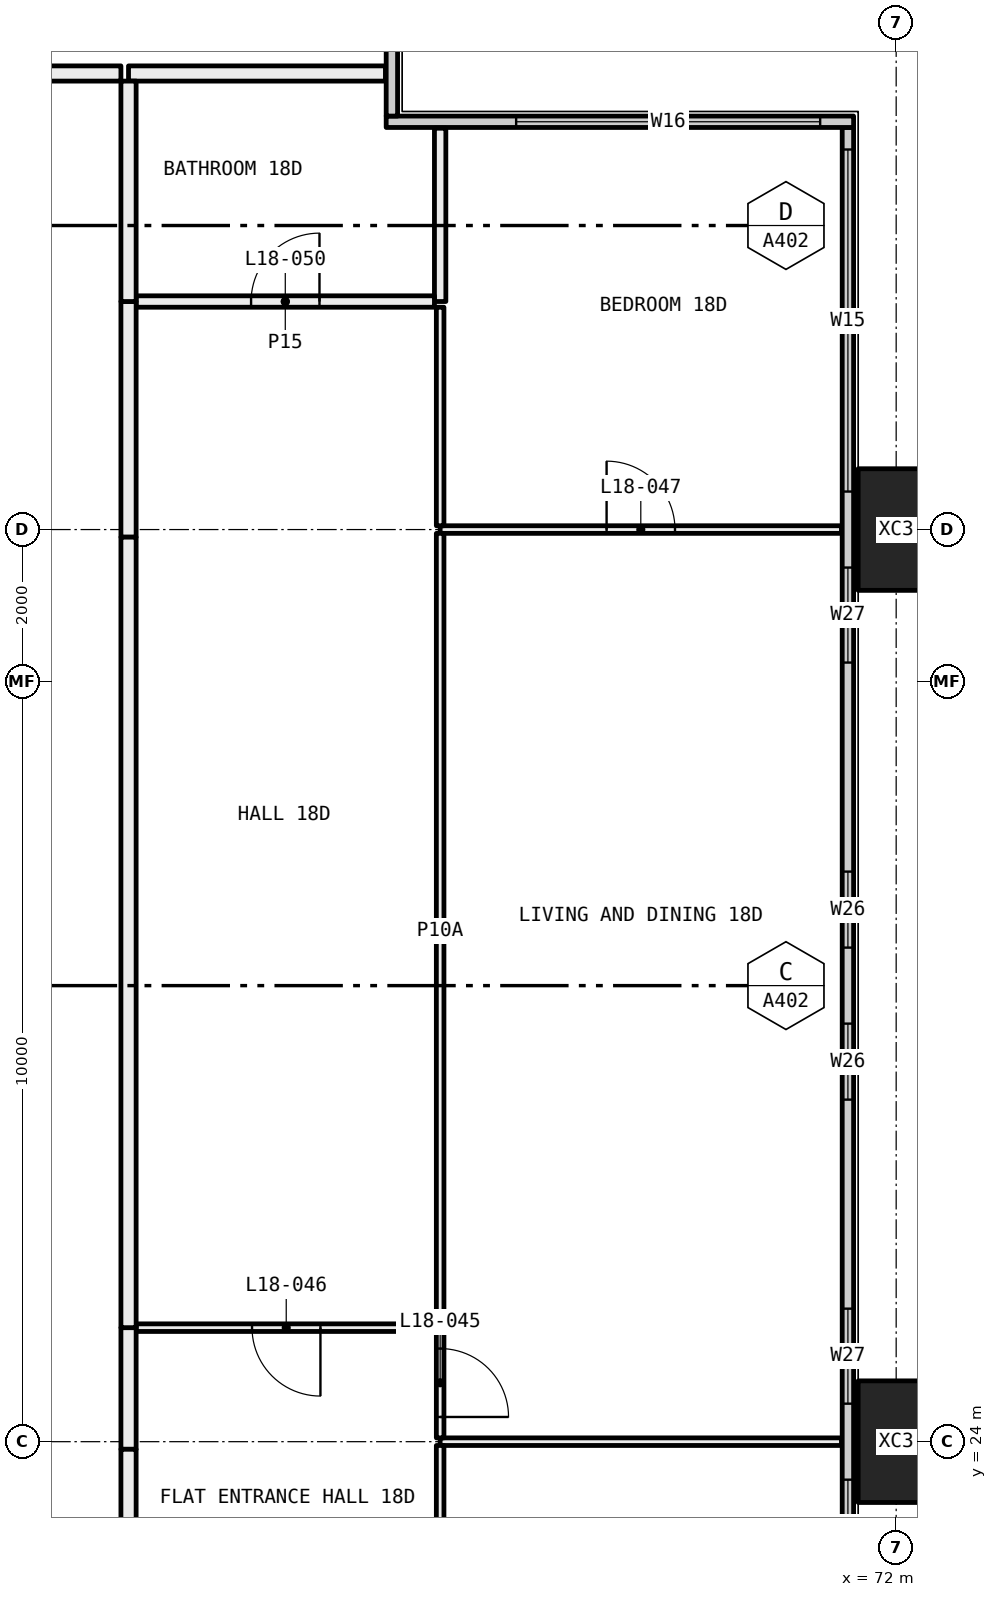
"""IFC4 building model, lengths in metres.
Left out: names, types, materials, properties, quantities, classifications, styles, units other than length and angle.
Written with IfcOpenShell. Run it as: python <this file> out.ifc"""

import sys

from ifc_helpers import new_model, si_unit, direction, frame, frame_2d, origin, origin_2d, place, context, subcontext, project, spatial, rectangle, hollow_rectangle, extrude, element, fill, save


model = new_model("IFC4")
c1 = context("Model", 3, precision=1e-05, world=origin(), true_north=direction((0.0, 1.0)))
c2 = subcontext(c1, "Body", "Model", "MODEL_VIEW")
j1 = project(units=[si_unit("LENGTHUNIT", "METRE"), si_unit("PLANEANGLEUNIT", "RADIAN")], contexts=[c1])
p1 = place(None, origin())
s1 = spatial("IfcSite", under=j1, at=p1, CompositionType="ELEMENT")
p2 = place(p1, origin())
s2 = spatial("IfcBuilding", under=s1, at=p2, CompositionType="ELEMENT")
p3 = place(p2, frame((0.0, 0.0, 74.85)))
s3 = spatial("IfcBuildingStorey", under=s2, at=p3, CompositionType="ELEMENT", Elevation=74.85)
for number, where, z_axis, x_axis in (
    (1, (72.0, 24.0, -0.4), (0.0, 0.0, 1.0), (0.0, 1.0, 0.0)),
    (2, (72.0, 36.0, -0.4), (0.0, 0.0, 1.0), (0.0, 1.0, 0.0)),
):
    element("IfcColumn", number, at=place(p3, frame(where, z_axis=z_axis, x_axis=x_axis)), inside=s3, PredefinedType="COLUMN", context=c2, shape_type="SweptSolid", body=[
        extrude(hollow_rectangle(XDim=1.6, YDim=1.0, WallThickness=0.065, at=origin_2d()), origin(), (0.0, 0.0, 1.0), 3.45),
    ])
p4 = place(p3, frame((71.365, 6.71, 0.0), z_axis=(0.0, 0.0, 1.0), x_axis=(0.0, 1.0, 0.0)))
e3 = element("IfcWall", 3, at=p4, inside=s3, PredefinedType="ELEMENTEDWALL", context=c2, shape_type="SweptSolid", body=[
    extrude(rectangle(XDim=34.58, YDim=0.15, at=frame_2d((17.29, 0.0))), origin(), (0.0, 0.0, 1.0), 3.05),
])
p5 = place(p4, frame((0.29, 0.0, 0.45)))
e4 = element("IfcOpeningElement", 4, at=p5, cuts=e3, PredefinedType="OPENING", context=c2, shape_type="SweptSolid", body=[
    extrude(rectangle(XDim=4.5, YDim=2.55, at=frame_2d((2.25, 1.275))), frame((0.0, 0.085, 0.0), z_axis=(0.0, -1.0, 0.0), x_axis=(1.0, 0.0, 0.0)), (0.0, 0.0, 1.0), 0.17),
])
p6 = place(p4, frame((5.79, 0.0, 0.45)))
e5 = element("IfcOpeningElement", 5, at=p6, cuts=e3, PredefinedType="OPENING", context=c2, shape_type="SweptSolid", body=[
    extrude(rectangle(XDim=1.25, YDim=2.55, at=frame_2d((0.625, 1.275))), frame((0.0, 0.085, 0.0), z_axis=(0.0, -1.0, 0.0), x_axis=(1.0, 0.0, 0.0)), (0.0, 0.0, 1.0), 0.17),
])
p7 = place(p4, frame((9.79, 0.0, 0.45)))
e6 = element("IfcOpeningElement", 6, at=p7, cuts=e3, PredefinedType="OPENING", context=c2, shape_type="SweptSolid", body=[
    extrude(rectangle(XDim=1.0, YDim=2.55, at=frame_2d((0.5, 1.275))), frame((0.0, 0.085, 0.0), z_axis=(0.0, -1.0, 0.0), x_axis=(1.0, 0.0, 0.0)), (0.0, 0.0, 1.0), 0.17),
])
p8 = place(p4, frame((11.79, 0.0, 0.45)))
e7 = element("IfcOpeningElement", 7, at=p8, cuts=e3, PredefinedType="OPENING", context=c2, shape_type="SweptSolid", body=[
    extrude(rectangle(XDim=1.0, YDim=2.55, at=frame_2d((0.5, 1.275))), frame((0.0, 0.085, 0.0), z_axis=(0.0, -1.0, 0.0), x_axis=(1.0, 0.0, 0.0)), (0.0, 0.0, 1.0), 0.17),
])
p9 = place(p4, frame((15.54, 0.0, 0.45)))
e8 = element("IfcOpeningElement", 8, at=p9, cuts=e3, PredefinedType="OPENING", context=c2, shape_type="SweptSolid", body=[
    extrude(rectangle(XDim=1.25, YDim=2.55, at=frame_2d((0.625, 1.275))), frame((0.0, 0.085, 0.0), z_axis=(0.0, -1.0, 0.0), x_axis=(1.0, 0.0, 0.0)), (0.0, 0.0, 1.0), 0.17),
])
p10 = place(p4, frame((17.79, 0.0, 0.45)))
e9 = element("IfcOpeningElement", 9, at=p10, cuts=e3, PredefinedType="OPENING", context=c2, shape_type="SweptSolid", body=[
    extrude(rectangle(XDim=1.25, YDim=2.55, at=frame_2d((0.625, 1.275))), frame((0.0, 0.085, 0.0), z_axis=(0.0, -1.0, 0.0), x_axis=(1.0, 0.0, 0.0)), (0.0, 0.0, 1.0), 0.17),
])
p11 = place(p4, frame((21.79, 0.0, 0.45)))
e10 = element("IfcOpeningElement", 10, at=p11, cuts=e3, PredefinedType="OPENING", context=c2, shape_type="SweptSolid", body=[
    extrude(rectangle(XDim=1.0, YDim=2.55, at=frame_2d((0.5, 1.275))), frame((0.0, 0.085, 0.0), z_axis=(0.0, -1.0, 0.0), x_axis=(1.0, 0.0, 0.0)), (0.0, 0.0, 1.0), 0.17),
])
p12 = place(p4, frame((23.79, 0.0, 0.45)))
e11 = element("IfcOpeningElement", 11, at=p12, cuts=e3, PredefinedType="OPENING", context=c2, shape_type="SweptSolid", body=[
    extrude(rectangle(XDim=1.0, YDim=2.55, at=frame_2d((0.5, 1.275))), frame((0.0, 0.085, 0.0), z_axis=(0.0, -1.0, 0.0), x_axis=(1.0, 0.0, 0.0)), (0.0, 0.0, 1.0), 0.17),
])
p13 = place(p4, frame((27.54, 0.0, 0.45)))
e12 = element("IfcOpeningElement", 12, at=p13, cuts=e3, PredefinedType="OPENING", context=c2, shape_type="SweptSolid", body=[
    extrude(rectangle(XDim=1.25, YDim=2.55, at=frame_2d((0.625, 1.275))), frame((0.0, 0.085, 0.0), z_axis=(0.0, -1.0, 0.0), x_axis=(1.0, 0.0, 0.0)), (0.0, 0.0, 1.0), 0.17),
])
p14 = place(p4, frame((29.79, 0.0, 0.45)))
e13 = element("IfcOpeningElement", 13, at=p14, cuts=e3, PredefinedType="OPENING", context=c2, shape_type="SweptSolid", body=[
    extrude(rectangle(XDim=4.5, YDim=2.55, at=frame_2d((2.25, 1.275))), frame((0.0, 0.085, 0.0), z_axis=(0.0, -1.0, 0.0), x_axis=(1.0, 0.0, 0.0)), (0.0, 0.0, 1.0), 0.17),
])
p15 = place(p3, frame((65.29, 41.365, 0.0), z_axis=(0.0, 0.0, 1.0), x_axis=(1.0, 0.0, 0.0)))
e14 = element("IfcWall", 14, at=p15, inside=s3, PredefinedType="ELEMENTEDWALL", context=c2, shape_type="SweptSolid", body=[
    extrude(rectangle(XDim=6.15, YDim=0.15, at=frame_2d((3.075, 0.0))), origin(), (0.0, 0.0, 1.0), 3.05),
])
p16 = place(p15, frame((1.71, 0.0, 0.45)))
e15 = element("IfcOpeningElement", 15, at=p16, cuts=e14, PredefinedType="OPENING", context=c2, shape_type="SweptSolid", body=[
    extrude(rectangle(XDim=4.0, YDim=2.55, at=frame_2d((2.0, 1.275))), frame((0.0, 0.085, 0.0), z_axis=(0.0, -1.0, 0.0), x_axis=(1.0, 0.0, 0.0)), (0.0, 0.0, 1.0), 0.17),
])
p17 = place(p3, frame((65.365, 41.44, 0.0), z_axis=(0.0, 0.0, 1.0), x_axis=(0.0, 1.0, 0.0)))
e16 = element("IfcWall", 16, at=p17, inside=s3, PredefinedType="ELEMENTEDWALL", context=c2, shape_type="SweptSolid", body=[
    extrude(rectangle(XDim=5.85, YDim=0.15, at=frame_2d((2.925, 0.0))), origin(), (0.0, 0.0, 1.0), 3.05),
])
p18 = place(p17, frame((1.56, 0.0, 0.45)))
e17 = element("IfcOpeningElement", 17, at=p18, cuts=e16, PredefinedType="OPENING", context=c2, shape_type="SweptSolid", body=[
    extrude(rectangle(XDim=4.0, YDim=2.55, at=frame_2d((2.0, 1.275))), frame((0.0, 0.085, 0.0), z_axis=(0.0, -1.0, 0.0), x_axis=(1.0, 0.0, 0.0)), (0.0, 0.0, 1.0), 0.17),
])
p19 = place(p3, frame((71.28, 24.0, 0.0), z_axis=(0.0, 0.0, 1.0), x_axis=(-1.0, 0.0, 0.0)))
e18 = element("IfcWall", 18, at=p19, inside=s3, PredefinedType="PARTITIONING", context=c2, shape_type="SweptSolid", body=[
    extrude(rectangle(XDim=5.28, YDim=0.1, at=frame_2d((2.64, 0.0))), origin(), (0.0, 0.0, 1.0), 2.45),
])
p20 = place(p3, frame((66.0, 23.95, 0.0), z_axis=(0.0, 0.0, 1.0), x_axis=(0.0, -1.0, 0.0)))
e19 = element("IfcWall", 19, at=p20, inside=s3, PredefinedType="PARTITIONING", context=c2, shape_type="SweptSolid", body=[
    extrude(rectangle(XDim=2.875, YDim=0.1, at=frame_2d((1.438, 0.0))), origin(), (0.0, 0.0, 1.0), 2.45),
])
p21 = place(p20, frame((0.988, 0.0, 0.0)))
e20 = element("IfcOpeningElement", 20, at=p21, cuts=e19, PredefinedType="OPENING", context=c2, shape_type="SweptSolid", body=[
    extrude(rectangle(XDim=0.9, YDim=2.1, at=frame_2d((0.45, 1.05))), frame((0.0, 0.06, 0.0), z_axis=(0.0, -1.0, 0.0), x_axis=(1.0, 0.0, 0.0)), (0.0, 0.0, 1.0), 0.12),
])
p22 = place(p3, frame((71.28, 36.0, 0.0), z_axis=(0.0, 0.0, 1.0), x_axis=(-1.0, 0.0, 0.0)))
e21 = element("IfcWall", 21, at=p22, inside=s3, PredefinedType="PARTITIONING", context=c2, shape_type="SweptSolid", body=[
    extrude(rectangle(XDim=5.28, YDim=0.1, at=frame_2d((2.64, 0.0))), origin(), (0.0, 0.0, 1.0), 2.45),
])
p23 = place(p22, frame((2.19, 0.0, 0.0)))
e22 = element("IfcOpeningElement", 22, at=p23, cuts=e21, PredefinedType="OPENING", context=c2, shape_type="SweptSolid", body=[
    extrude(rectangle(XDim=0.9, YDim=2.1, at=frame_2d((0.45, 1.05))), frame((0.0, 0.06, 0.0), z_axis=(0.0, -1.0, 0.0), x_axis=(1.0, 0.0, 0.0)), (0.0, 0.0, 1.0), 0.12),
])
p24 = place(p3, frame((66.0, 25.5, 0.0), z_axis=(0.0, 0.0, 1.0), x_axis=(0.0, -1.0, 0.0)))
e23 = element("IfcWall", 23, at=p24, inside=s3, PredefinedType="PARTITIONING", context=c2, shape_type="SweptSolid", body=[
    extrude(rectangle(XDim=1.45, YDim=0.1, at=frame_2d((0.725, 0.0))), origin(), (0.0, 0.0, 1.0), 2.45),
])
p25 = place(p24, frame((0.275, 0.0, 0.0)))
e24 = element("IfcOpeningElement", 24, at=p25, cuts=e23, PredefinedType="OPENING", context=c2, shape_type="SweptSolid", body=[
    extrude(rectangle(XDim=0.9, YDim=2.1, at=frame_2d((0.45, 1.05))), frame((0.0, 0.06, 0.0), z_axis=(0.0, -1.0, 0.0), x_axis=(1.0, 0.0, 0.0)), (0.0, 0.0, 1.0), 0.12),
])
p26 = place(p3, frame((66.0, 35.95, 0.0), z_axis=(0.0, 0.0, 1.0), x_axis=(0.0, -1.0, 0.0)))
e25 = element("IfcWall", 25, at=p26, inside=s3, PredefinedType="PARTITIONING", context=c2, shape_type="SweptSolid", body=[
    extrude(rectangle(XDim=10.45, YDim=0.1, at=frame_2d((5.225, 0.0))), origin(), (0.0, 0.0, 1.0), 2.45),
])
p27 = place(p3, frame((66.0, 38.925, 0.0), z_axis=(0.0, 0.0, 1.0), x_axis=(0.0, -1.0, 0.0)))
e26 = element("IfcWall", 26, at=p27, inside=s3, PredefinedType="PARTITIONING", context=c2, shape_type="SweptSolid", body=[
    extrude(rectangle(XDim=2.875, YDim=0.1, at=frame_2d((1.438, 0.0))), origin(), (0.0, 0.0, 1.0), 2.45),
])
p28 = place(p3, frame((66.0, 41.28, 0.0), z_axis=(0.0, 0.0, 1.0), x_axis=(0.0, -1.0, 0.0)))
e27 = element("IfcWall", 27, at=p28, inside=s3, PredefinedType="PARTITIONING", context=c2, shape_type="SweptSolid", body=[
    extrude(rectangle(XDim=2.28, YDim=0.15, at=frame_2d((1.14, 0.0))), origin(), (0.0, 0.0, 1.0), 3.05),
])
p29 = place(p3, frame((65.95, 25.5, 0.0), z_axis=(0.0, 0.0, 1.0), x_axis=(-1.0, 0.0, 0.0)))
e28 = element("IfcWall", 28, at=p29, inside=s3, PredefinedType="PARTITIONING", context=c2, shape_type="SweptSolid", body=[
    extrude(rectangle(XDim=3.95, YDim=0.1, at=frame_2d((1.975, 0.0))), origin(), (0.0, 0.0, 1.0), 3.05),
])
p30 = place(p29, frame((1.525, 0.0, 0.0)))
e29 = element("IfcOpeningElement", 29, at=p30, cuts=e28, PredefinedType="OPENING", context=c2, shape_type="SweptSolid", body=[
    extrude(rectangle(XDim=0.9, YDim=2.1, at=frame_2d((0.45, 1.05))), frame((0.0, 0.06, 0.0), z_axis=(0.0, -1.0, 0.0), x_axis=(1.0, 0.0, 0.0)), (0.0, 0.0, 1.0), 0.12),
])
p31 = place(p3, frame((61.9, 25.5, 0.0), z_axis=(0.0, 0.0, 1.0), x_axis=(0.0, -1.0, 0.0)))
e30 = element("IfcWall", 30, at=p31, inside=s3, PredefinedType="PARTITIONING", context=c2, shape_type="SweptSolid", body=[
    extrude(rectangle(XDim=1.6, YDim=0.2, at=frame_2d((0.8, 0.0))), origin(), (0.0, 0.0, 1.0), 2.45),
])
p32 = place(p3, frame((61.9, 23.9, 0.0), z_axis=(0.0, 0.0, 1.0), x_axis=(0.0, -1.0, 0.0)))
e31 = element("IfcWall", 31, at=p32, inside=s3, PredefinedType="PARTITIONING", context=c2, shape_type="SweptSolid", body=[
    extrude(rectangle(XDim=2.9, YDim=0.2, at=frame_2d((1.45, 0.0))), origin(), (0.0, 0.0, 1.0), 3.05),
])
p33 = place(p32, frame((0.95, 0.0, 0.0)))
e32 = element("IfcOpeningElement", 32, at=p33, cuts=e31, PredefinedType="OPENING", context=c2, shape_type="SweptSolid", body=[
    extrude(rectangle(XDim=1.0, YDim=2.1, at=frame_2d((0.5, 1.05))), frame((0.0, 0.11, 0.0), z_axis=(0.0, -1.0, 0.0), x_axis=(1.0, 0.0, 0.0)), (0.0, 0.0, 1.0), 0.22),
])
p34 = place(p3, frame((65.925, 39.0, 0.0), z_axis=(0.0, 0.0, 1.0), x_axis=(-1.0, 0.0, 0.0)))
e33 = element("IfcWall", 33, at=p34, inside=s3, PredefinedType="PARTITIONING", context=c2, shape_type="SweptSolid", body=[
    extrude(rectangle(XDim=3.925, YDim=0.15, at=frame_2d((1.962, 0.0))), origin(), (0.0, 0.0, 1.0), 3.05),
])
p35 = place(p34, frame((1.512, 0.0, 0.0)))
e34 = element("IfcOpeningElement", 34, at=p35, cuts=e33, PredefinedType="OPENING", context=c2, shape_type="SweptSolid", body=[
    extrude(rectangle(XDim=0.9, YDim=2.1, at=frame_2d((0.45, 1.05))), frame((0.0, 0.085, 0.0), z_axis=(0.0, -1.0, 0.0), x_axis=(1.0, 0.0, 0.0)), (0.0, 0.0, 1.0), 0.17),
])
p36 = place(p3, frame((61.9, 39.0, 0.0), z_axis=(0.0, 0.0, 1.0), x_axis=(0.0, -1.0, 0.0)))
e35 = element("IfcWall", 35, at=p36, inside=s3, PredefinedType="PARTITIONING", context=c2, shape_type="SweptSolid", body=[
    extrude(rectangle(XDim=3.1, YDim=0.2, at=frame_2d((1.55, 0.0))), origin(), (0.0, 0.0, 1.0), 2.45),
])
p37 = place(p3, frame((61.9, 35.9, 0.0), z_axis=(0.0, 0.0, 1.0), x_axis=(0.0, -1.0, 0.0)))
e36 = element("IfcWall", 36, at=p37, inside=s3, PredefinedType="PARTITIONING", context=c2, shape_type="SweptSolid", body=[
    extrude(rectangle(XDim=10.4, YDim=0.2, at=frame_2d((5.2, 0.0))), origin(), (0.0, 0.0, 1.0), 3.05),
])
p38 = place(p3, frame((65.28, 42.0, 0.0), z_axis=(0.0, 0.0, 1.0), x_axis=(-1.0, 0.0, 0.0)))
e37 = element("IfcWall", 37, at=p38, inside=s3, PredefinedType="PARTITIONING", context=c2, shape_type="SweptSolid", body=[
    extrude(rectangle(XDim=3.38, YDim=0.2, at=frame_2d((1.69, 0.0))), origin(), (0.0, 0.0, 1.0), 3.05),
])
p39 = place(p3, frame((61.9, 41.9, 0.0), z_axis=(0.0, 0.0, 1.0), x_axis=(0.0, -1.0, 0.0)))
e38 = element("IfcWall", 38, at=p39, inside=s3, PredefinedType="PARTITIONING", context=c2, shape_type="SweptSolid", body=[
    extrude(rectangle(XDim=2.9, YDim=0.2, at=frame_2d((1.45, 0.0))), origin(), (0.0, 0.0, 1.0), 3.05),
])
p40 = place(p3, frame((60.0, 42.0, 0.0), z_axis=(0.0, 0.0, 1.0), x_axis=(1.0, 0.0, 0.0)))
e39 = element("IfcWall", 39, at=p40, inside=s3, PredefinedType="PARTITIONING", context=c2, shape_type="SweptSolid", body=[
    extrude(rectangle(XDim=1.8, YDim=0.2, at=frame_2d((0.9, 0.0))), origin(), (0.0, 0.0, 1.0), 3.05),
])
p41 = place(p9, origin())
e40 = element("IfcWindow", 40, at=p41, inside=s3, PartitioningType="SINGLE_PANEL", PredefinedType="WINDOW", context=c2, shape_type="SweptSolid", body=[
    extrude(rectangle(XDim=1.25, YDim=2.55, at=frame_2d((0.625, 1.275))), frame((0.0, 0.03, 0.0), z_axis=(0.0, -1.0, 0.0), x_axis=(1.0, 0.0, 0.0)), (0.0, 0.0, 1.0), 0.06),
])
fill(e8, e40)
p42 = place(p10, origin())
e41 = element("IfcWindow", 41, at=p42, inside=s3, PartitioningType="SINGLE_PANEL", PredefinedType="WINDOW", context=c2, shape_type="SweptSolid", body=[
    extrude(rectangle(XDim=1.25, YDim=2.55, at=frame_2d((0.625, 1.275))), frame((0.0, 0.03, 0.0), z_axis=(0.0, -1.0, 0.0), x_axis=(1.0, 0.0, 0.0)), (0.0, 0.0, 1.0), 0.06),
])
fill(e9, e41)
p43 = place(p11, origin())
e42 = element("IfcWindow", 42, at=p43, inside=s3, PartitioningType="SINGLE_PANEL", PredefinedType="WINDOW", context=c2, shape_type="SweptSolid", body=[
    extrude(rectangle(XDim=1.0, YDim=2.55, at=frame_2d((0.5, 1.275))), frame((0.0, 0.03, 0.0), z_axis=(0.0, -1.0, 0.0), x_axis=(1.0, 0.0, 0.0)), (0.0, 0.0, 1.0), 0.06),
])
fill(e10, e42)
p44 = place(p12, origin())
e43 = element("IfcWindow", 43, at=p44, inside=s3, PartitioningType="SINGLE_PANEL", PredefinedType="WINDOW", context=c2, shape_type="SweptSolid", body=[
    extrude(rectangle(XDim=1.0, YDim=2.55, at=frame_2d((0.5, 1.275))), frame((0.0, 0.03, 0.0), z_axis=(0.0, -1.0, 0.0), x_axis=(1.0, 0.0, 0.0)), (0.0, 0.0, 1.0), 0.06),
])
fill(e11, e43)
p45 = place(p13, origin())
e44 = element("IfcWindow", 44, at=p45, inside=s3, PartitioningType="SINGLE_PANEL", PredefinedType="WINDOW", context=c2, shape_type="SweptSolid", body=[
    extrude(rectangle(XDim=1.25, YDim=2.55, at=frame_2d((0.625, 1.275))), frame((0.0, 0.03, 0.0), z_axis=(0.0, -1.0, 0.0), x_axis=(1.0, 0.0, 0.0)), (0.0, 0.0, 1.0), 0.06),
])
fill(e12, e44)
p46 = place(p14, origin())
e45 = element("IfcWindow", 45, at=p46, inside=s3, PartitioningType="SINGLE_PANEL", PredefinedType="WINDOW", context=c2, shape_type="SweptSolid", body=[
    extrude(rectangle(XDim=4.5, YDim=2.55, at=frame_2d((2.25, 1.275))), frame((0.0, 0.03, 0.0), z_axis=(0.0, -1.0, 0.0), x_axis=(1.0, 0.0, 0.0)), (0.0, 0.0, 1.0), 0.06),
])
fill(e13, e45)
p47 = place(p16, origin())
e46 = element("IfcWindow", 46, at=p47, inside=s3, PartitioningType="SINGLE_PANEL", PredefinedType="WINDOW", context=c2, shape_type="SweptSolid", body=[
    extrude(rectangle(XDim=4.0, YDim=2.55, at=frame_2d((2.0, 1.275))), frame((0.0, 0.03, 0.0), z_axis=(0.0, -1.0, 0.0), x_axis=(1.0, 0.0, 0.0)), (0.0, 0.0, 1.0), 0.06),
])
fill(e15, e46)
p48 = place(p25, origin())
e47 = element("IfcDoor", 47, at=p48, inside=s3, OperationType="SINGLE_SWING_LEFT", PredefinedType="DOOR", context=c2, shape_type="SweptSolid", body=[
    extrude(rectangle(XDim=0.9, YDim=2.1, at=frame_2d((0.45, 1.05))), frame((0.0, 0.025, 0.0), z_axis=(0.0, -1.0, 0.0), x_axis=(1.0, 0.0, 0.0)), (0.0, 0.0, 1.0), 0.05),
])
fill(e24, e47)
p49 = place(p30, origin())
e48 = element("IfcDoor", 48, at=p49, inside=s3, OperationType="SINGLE_SWING_RIGHT", PredefinedType="DOOR", context=c2, shape_type="SweptSolid", body=[
    extrude(rectangle(XDim=0.9, YDim=2.1, at=frame_2d((0.45, 1.05))), frame((0.0, 0.025, 0.0), z_axis=(0.0, -1.0, 0.0), x_axis=(1.0, 0.0, 0.0)), (0.0, 0.0, 1.0), 0.05),
])
fill(e29, e48)
p50 = place(p23, frame((0.9, 0.0, 0.0), x_axis=(-1.0, 0.0, 0.0)))
e49 = element("IfcDoor", 49, at=p50, inside=s3, OperationType="SINGLE_SWING_RIGHT", PredefinedType="DOOR", context=c2, shape_type="SweptSolid", body=[
    extrude(rectangle(XDim=0.9, YDim=2.1, at=frame_2d((0.45, 1.05))), frame((0.0, 0.025, 0.0), z_axis=(0.0, -1.0, 0.0), x_axis=(1.0, 0.0, 0.0)), (0.0, 0.0, 1.0), 0.05),
])
fill(e22, e49)
p51 = place(p35, frame((0.9, 0.0, 0.0), x_axis=(-1.0, 0.0, 0.0)))
e50 = element("IfcDoor", 50, at=p51, inside=s3, OperationType="SINGLE_SWING_LEFT", PredefinedType="DOOR", context=c2, shape_type="SweptSolid", body=[
    extrude(rectangle(XDim=0.9, YDim=2.1, at=frame_2d((0.45, 1.05))), frame((0.0, 0.025, 0.0), z_axis=(0.0, -1.0, 0.0), x_axis=(1.0, 0.0, 0.0)), (0.0, 0.0, 1.0), 0.05),
])
fill(e34, e50)
save(model, sys.argv[1])
